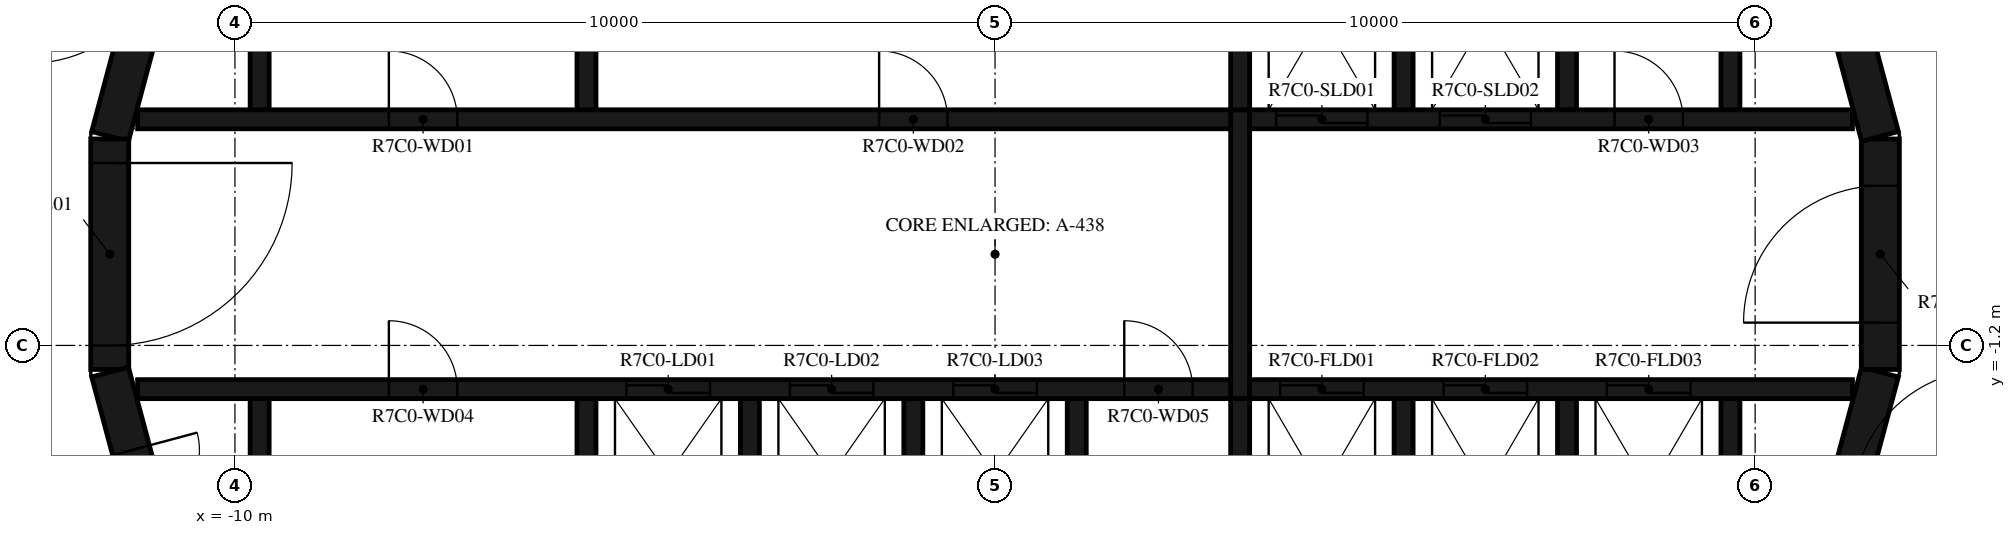
"""IFC4 building model, lengths in metres.
Left out: names, types, materials, properties, quantities, classifications, styles, units other than length and angle.
Written with IfcOpenShell. Run it as: python <this file> out.ifc"""

import sys

from ifc_helpers import new_model, si_unit, direction, frame, frame_2d, origin, place, context, subcontext, project, spatial, polyline, rectangle, outline, extrude, element, fill, save


model = new_model("IFC4")
c1 = context("Model", 3, precision=1e-05, world=origin(), true_north=direction((0.0, 1.0)))
c2 = subcontext(c1, "Body", "Model", "MODEL_VIEW")
j1 = project(units=[si_unit("LENGTHUNIT", "METRE"), si_unit("PLANEANGLEUNIT", "RADIAN")], contexts=[c1])
p1 = place(None, origin())
s1 = spatial("IfcSite", under=j1, at=p1, CompositionType="ELEMENT")
p2 = place(p1, origin())
s2 = spatial("IfcBuilding", under=s1, at=p2, CompositionType="ELEMENT")
p3 = place(p2, frame((0.0, 0.0, 284.4)))
s3 = spatial("IfcBuildingStorey", under=s2, at=p3, CompositionType="ELEMENT", Elevation=284.4)
p4 = place(p3, frame((10.858, -4.479, 0.0), z_axis=(0.0, 0.0, 1.0), x_axis=(0.258734743916, 0.965948410781, 0.0)))
e1 = element("IfcWall", 1, at=p4, inside=s3, PredefinedType="SHEAR", context=c2, shape_type="SweptSolid", body=[
    extrude(rectangle(XDim=3.033, YDim=0.5, at=frame_2d((1.516, 0.0))), origin(), (0.0, 0.0, 1.0), 3.12),
])
p5 = place(p3, frame((11.647, -1.516, 0.0), z_axis=(0.0, 0.0, 1.0), x_axis=(0.0, 1.0, 0.0)))
e2 = element("IfcWall", 2, at=p5, inside=s3, PredefinedType="SHEAR", context=c2, shape_type="SweptSolid", body=[
    extrude(rectangle(XDim=3.033, YDim=0.5, at=frame_2d((1.516, 0.0))), origin(), (0.0, 0.0, 1.0), 3.12),
])
p6 = place(p5, frame((0.616, 0.0, 0.0)))
e3 = element("IfcOpeningElement", 3, at=p6, cuts=e2, PredefinedType="OPENING", context=c2, shape_type="SweptSolid", body=[
    extrude(rectangle(XDim=1.8, YDim=2.1, at=frame_2d((0.9, 1.05))), frame((0.0, 0.26, 0.0), z_axis=(0.0, -1.0, 0.0), x_axis=(1.0, 0.0, 0.0)), (0.0, 0.0, 1.0), 0.52),
])
for number, where, z_axis, x_axis in (
    (4, (11.643, 1.55, 0.0), (0.0, 0.0, 1.0), (-0.259, 0.966, 0.0)),
    (5, (-10.858, 4.479, 0.0), (0.0, 0.0, 1.0), (-0.259, -0.966, 0.0)),
):
    element("IfcWall", number, at=place(p3, frame(where, z_axis=z_axis, x_axis=x_axis)), inside=s3, PredefinedType="SHEAR", context=c2, shape_type="SweptSolid", body=[
        extrude(rectangle(XDim=3.033, YDim=0.5, at=frame_2d((1.516, 0.0))), origin(), (0.0, 0.0, 1.0), 3.12),
    ])
p7 = place(p3, frame((-11.647, 1.516, 0.0), z_axis=(0.0, 0.0, 1.0), x_axis=(0.0, -1.0, 0.0)))
e6 = element("IfcWall", 6, at=p7, inside=s3, PredefinedType="SHEAR", context=c2, shape_type="SweptSolid", body=[
    extrude(rectangle(XDim=3.033, YDim=0.5, at=frame_2d((1.516, 0.0))), origin(), (0.0, 0.0, 1.0), 3.12),
])
p8 = place(p7, frame((0.316, 0.0, 0.0)))
e7 = element("IfcOpeningElement", 7, at=p8, cuts=e6, PredefinedType="OPENING", context=c2, shape_type="SweptSolid", body=[
    extrude(rectangle(XDim=2.4, YDim=2.1, at=frame_2d((1.2, 1.05))), frame((0.0, 0.26, 0.0), z_axis=(0.0, -1.0, 0.0), x_axis=(1.0, 0.0, 0.0)), (0.0, 0.0, 1.0), 0.52),
])
p9 = place(p3, frame((-11.643, -1.55, 0.0), z_axis=(0.0, 0.0, 1.0), x_axis=(0.258734743916, -0.965948410781, 0.0)))
e8 = element("IfcWall", 8, at=p9, inside=s3, PredefinedType="SHEAR", context=c2, shape_type="SweptSolid", body=[
    extrude(rectangle(XDim=3.033, YDim=0.5, at=frame_2d((1.516, 0.0))), origin(), (0.0, 0.0, 1.0), 3.12),
])
p10 = place(p9, frame((1.066, 0.0, 0.0)))
e9 = element("IfcOpeningElement", 9, at=p10, cuts=e8, PredefinedType="OPENING", context=c2, shape_type="SweptSolid", body=[
    extrude(rectangle(XDim=0.9, YDim=2.1, at=frame_2d((0.45, 1.05))), frame((0.0, 0.26, 0.0), z_axis=(0.0, -1.0, 0.0), x_axis=(1.0, 0.0, 0.0)), (0.0, 0.0, 1.0), 0.52),
])
p11 = place(p3, origin())
e10 = element("IfcWall", 10, at=p11, inside=s3, PredefinedType="SHEAR", context=c2, shape_type="SweptSolid", body=[
    extrude(outline(polyline([(-9.8, 1.9), (-9.55, 1.9), (-9.55, 4.8), (-5.5, 4.8), (-5.5, 1.9), (-5.25, 1.9), (-5.25, 4.8), (3.1, 4.8), (3.1, 1.9), (3.35, 1.9), (3.35, 4.8), (5.25, 4.8), (5.25, 1.9), (5.5, 1.9), (5.5, 4.8), (7.4, 4.8), (7.4, 1.9), (7.65, 1.9), (7.65, 4.8), (9.55, 4.8), (9.55, 1.9), (9.8, 1.9), (9.8, 4.8), (9.8, 5.05), (-9.8, 5.05), (-9.8, 4.8), (-9.8, 1.9)])), origin(), (0.0, 0.0, 1.0), 3.12),
])
p12 = place(p3, origin())
e11 = element("IfcWall", 11, at=p12, inside=s3, PredefinedType="SHEAR", context=c2, shape_type="SweptSolid", body=[
    extrude(outline(polyline([(9.8, -5.05), (9.8, -4.8), (9.8, -1.9), (9.55, -1.9), (9.55, -4.8), (7.65, -4.8), (7.65, -1.9), (7.4, -1.9), (7.4, -4.8), (5.5, -4.8), (5.5, -1.9), (5.25, -1.9), (5.25, -4.8), (3.35, -4.8), (3.35, -1.9), (3.1, -1.9), (3.1, -4.8), (1.2, -4.8), (1.2, -1.9), (0.95, -1.9), (0.95, -4.8), (-0.95, -4.8), (-0.95, -1.9), (-1.2, -1.9), (-1.2, -4.8), (-3.1, -4.8), (-3.1, -1.9), (-3.35, -1.9), (-3.35, -4.8), (-5.25, -4.8), (-5.25, -1.9), (-5.5, -1.9), (-5.5, -4.8), (-9.55, -4.8), (-9.55, -1.9), (-9.8, -1.9), (-9.8, -4.8), (-9.8, -5.05), (9.8, -5.05)])), origin(), (0.0, 0.0, 1.0), 3.12),
])
p13 = place(p3, frame((-11.28, 1.775, 0.0), z_axis=(0.0, 0.0, 1.0), x_axis=(1.0, 0.0, 0.0)))
e12 = element("IfcWall", 12, at=p13, inside=s3, PredefinedType="SHEAR", context=c2, shape_type="SweptSolid", body=[
    extrude(rectangle(XDim=14.38, YDim=0.25, at=frame_2d((7.19, 0.0))), origin(), (0.0, 0.0, 1.0), 3.12),
])
p14 = place(p13, frame((3.305, 0.0, 0.0)))
e13 = element("IfcOpeningElement", 13, at=p14, cuts=e12, PredefinedType="OPENING", context=c2, shape_type="SweptSolid", body=[
    extrude(rectangle(XDim=0.9, YDim=2.1, at=frame_2d((0.45, 1.05))), frame((0.0, 0.135, 0.0), z_axis=(0.0, -1.0, 0.0), x_axis=(1.0, 0.0, 0.0)), (0.0, 0.0, 1.0), 0.27),
])
p15 = place(p13, frame((9.755, 0.0, 0.0)))
e14 = element("IfcOpeningElement", 14, at=p15, cuts=e12, PredefinedType="OPENING", context=c2, shape_type="SweptSolid", body=[
    extrude(rectangle(XDim=0.9, YDim=2.1, at=frame_2d((0.45, 1.05))), frame((0.0, 0.135, 0.0), z_axis=(0.0, -1.0, 0.0), x_axis=(1.0, 0.0, 0.0)), (0.0, 0.0, 1.0), 0.27),
])
p16 = place(p3, frame((3.35, 1.775, 0.0), z_axis=(0.0, 0.0, 1.0), x_axis=(1.0, 0.0, 0.0)))
e15 = element("IfcWall", 15, at=p16, inside=s3, PredefinedType="SHEAR", context=c2, shape_type="SweptSolid", body=[
    extrude(rectangle(XDim=7.93, YDim=0.25, at=frame_2d((3.965, 0.0))), origin(), (0.0, 0.0, 1.0), 3.12),
])
p17 = place(p16, frame((0.35, 0.0, 0.0)))
e16 = element("IfcOpeningElement", 16, at=p17, cuts=e15, PredefinedType="OPENING", context=c2, shape_type="SweptSolid", body=[
    extrude(rectangle(XDim=1.2, YDim=2.4, at=frame_2d((0.6, 1.2))), frame((0.0, 0.135, 0.0), z_axis=(0.0, -1.0, 0.0), x_axis=(1.0, 0.0, 0.0)), (0.0, 0.0, 1.0), 0.27),
])
p18 = place(p16, frame((2.5, 0.0, 0.0)))
e17 = element("IfcOpeningElement", 17, at=p18, cuts=e15, PredefinedType="OPENING", context=c2, shape_type="SweptSolid", body=[
    extrude(rectangle(XDim=1.2, YDim=2.4, at=frame_2d((0.6, 1.2))), frame((0.0, 0.135, 0.0), z_axis=(0.0, -1.0, 0.0), x_axis=(1.0, 0.0, 0.0)), (0.0, 0.0, 1.0), 0.27),
])
p19 = place(p16, frame((4.8, 0.0, 0.0)))
e18 = element("IfcOpeningElement", 18, at=p19, cuts=e15, PredefinedType="OPENING", context=c2, shape_type="SweptSolid", body=[
    extrude(rectangle(XDim=0.9, YDim=2.1, at=frame_2d((0.45, 1.05))), frame((0.0, 0.135, 0.0), z_axis=(0.0, -1.0, 0.0), x_axis=(1.0, 0.0, 0.0)), (0.0, 0.0, 1.0), 0.27),
])
p20 = place(p3, frame((-11.28, -1.775, 0.0), z_axis=(0.0, 0.0, 1.0), x_axis=(1.0, 0.0, 0.0)))
e19 = element("IfcWall", 19, at=p20, inside=s3, PredefinedType="SHEAR", context=c2, shape_type="SweptSolid", body=[
    extrude(rectangle(XDim=14.38, YDim=0.25, at=frame_2d((7.19, 0.0))), origin(), (0.0, 0.0, 1.0), 3.12),
])
p21 = place(p20, frame((6.43, 0.0, 0.0)))
e20 = element("IfcOpeningElement", 20, at=p21, cuts=e19, PredefinedType="OPENING", context=c2, shape_type="SweptSolid", body=[
    extrude(rectangle(XDim=1.1, YDim=2.1, at=frame_2d((0.55, 1.05))), frame((0.0, 0.135, 0.0), z_axis=(0.0, -1.0, 0.0), x_axis=(1.0, 0.0, 0.0)), (0.0, 0.0, 1.0), 0.27),
])
p22 = place(p20, frame((8.58, 0.0, 0.0)))
e21 = element("IfcOpeningElement", 21, at=p22, cuts=e19, PredefinedType="OPENING", context=c2, shape_type="SweptSolid", body=[
    extrude(rectangle(XDim=1.1, YDim=2.1, at=frame_2d((0.55, 1.05))), frame((0.0, 0.135, 0.0), z_axis=(0.0, -1.0, 0.0), x_axis=(1.0, 0.0, 0.0)), (0.0, 0.0, 1.0), 0.27),
])
p23 = place(p20, frame((10.73, 0.0, 0.0)))
e22 = element("IfcOpeningElement", 22, at=p23, cuts=e19, PredefinedType="OPENING", context=c2, shape_type="SweptSolid", body=[
    extrude(rectangle(XDim=1.1, YDim=2.1, at=frame_2d((0.55, 1.05))), frame((0.0, 0.135, 0.0), z_axis=(0.0, -1.0, 0.0), x_axis=(1.0, 0.0, 0.0)), (0.0, 0.0, 1.0), 0.27),
])
p24 = place(p20, frame((3.305, 0.0, 0.0)))
e23 = element("IfcOpeningElement", 23, at=p24, cuts=e19, PredefinedType="OPENING", context=c2, shape_type="SweptSolid", body=[
    extrude(rectangle(XDim=0.9, YDim=2.1, at=frame_2d((0.45, 1.05))), frame((0.0, 0.135, 0.0), z_axis=(0.0, -1.0, 0.0), x_axis=(1.0, 0.0, 0.0)), (0.0, 0.0, 1.0), 0.27),
])
p25 = place(p20, frame((12.98, 0.0, 0.0)))
e24 = element("IfcOpeningElement", 24, at=p25, cuts=e19, PredefinedType="OPENING", context=c2, shape_type="SweptSolid", body=[
    extrude(rectangle(XDim=0.9, YDim=2.1, at=frame_2d((0.45, 1.05))), frame((0.0, 0.135, 0.0), z_axis=(0.0, -1.0, 0.0), x_axis=(1.0, 0.0, 0.0)), (0.0, 0.0, 1.0), 0.27),
])
p26 = place(p3, frame((3.35, -1.775, 0.0), z_axis=(0.0, 0.0, 1.0), x_axis=(1.0, 0.0, 0.0)))
e25 = element("IfcWall", 25, at=p26, inside=s3, PredefinedType="SHEAR", context=c2, shape_type="SweptSolid", body=[
    extrude(rectangle(XDim=7.93, YDim=0.25, at=frame_2d((3.965, 0.0))), origin(), (0.0, 0.0, 1.0), 3.12),
])
p27 = place(p26, frame((0.4, 0.0, 0.0)))
e26 = element("IfcOpeningElement", 26, at=p27, cuts=e25, PredefinedType="OPENING", context=c2, shape_type="SweptSolid", body=[
    extrude(rectangle(XDim=1.1, YDim=2.4, at=frame_2d((0.55, 1.2))), frame((0.0, 0.135, 0.0), z_axis=(0.0, -1.0, 0.0), x_axis=(1.0, 0.0, 0.0)), (0.0, 0.0, 1.0), 0.27),
])
p28 = place(p26, frame((2.55, 0.0, 0.0)))
e27 = element("IfcOpeningElement", 27, at=p28, cuts=e25, PredefinedType="OPENING", context=c2, shape_type="SweptSolid", body=[
    extrude(rectangle(XDim=1.1, YDim=2.4, at=frame_2d((0.55, 1.2))), frame((0.0, 0.135, 0.0), z_axis=(0.0, -1.0, 0.0), x_axis=(1.0, 0.0, 0.0)), (0.0, 0.0, 1.0), 0.27),
])
p29 = place(p26, frame((4.7, 0.0, 0.0)))
e28 = element("IfcOpeningElement", 28, at=p29, cuts=e25, PredefinedType="OPENING", context=c2, shape_type="SweptSolid", body=[
    extrude(rectangle(XDim=1.1, YDim=2.4, at=frame_2d((0.55, 1.2))), frame((0.0, 0.135, 0.0), z_axis=(0.0, -1.0, 0.0), x_axis=(1.0, 0.0, 0.0)), (0.0, 0.0, 1.0), 0.27),
])
p30 = place(p3, frame((3.225, -1.9, 0.0), z_axis=(0.0, 0.0, 1.0), x_axis=(0.0, 1.0, 0.0)))
e29 = element("IfcWall", 29, at=p30, inside=s3, PredefinedType="SHEAR", context=c2, shape_type="SweptSolid", body=[
    extrude(rectangle(XDim=3.8, YDim=0.25, at=frame_2d((1.9, 0.0))), origin(), (0.0, 0.0, 1.0), 3.12),
])
p31 = place(p3, frame((11.223, -8.154, 0.0), z_axis=(0.0, 0.0, 1.0), x_axis=(0.358341090983, 0.93359073609, 0.0)))
e30 = element("IfcWall", 30, at=p31, inside=s3, PredefinedType="STANDARD", context=c2, shape_type="SweptSolid", body=[
    extrude(rectangle(XDim=7.181, YDim=0.2, at=frame_2d((3.59, 0.0))), origin(), (0.0, 0.0, 1.0), 3.12),
])
p32 = place(p31, frame((5.185, 0.0, 0.0)))
e31 = element("IfcOpeningElement", 31, at=p32, cuts=e30, PredefinedType="OPENING", context=c2, shape_type="SweptSolid", body=[
    extrude(rectangle(XDim=1.8, YDim=2.1, at=frame_2d((0.9, 1.05))), frame((0.0, 0.11, 0.0), z_axis=(0.0, -1.0, 0.0), x_axis=(1.0, 0.0, 0.0)), (0.0, 0.0, 1.0), 0.22),
])
p33 = place(p3, frame((-11.223, 8.154, 0.0), z_axis=(0.0, 0.0, 1.0), x_axis=(-0.358341090983, -0.93359073609, 0.0)))
e32 = element("IfcWall", 32, at=p33, inside=s3, PredefinedType="STANDARD", context=c2, shape_type="SweptSolid", body=[
    extrude(rectangle(XDim=7.181, YDim=0.2, at=frame_2d((3.59, 0.0))), origin(), (0.0, 0.0, 1.0), 3.12),
])
p34 = place(p33, frame((4.114, 0.0, 0.0)))
e33 = element("IfcOpeningElement", 33, at=p34, cuts=e32, PredefinedType="OPENING", context=c2, shape_type="SweptSolid", body=[
    extrude(rectangle(XDim=1.8, YDim=2.1, at=frame_2d((0.9, 1.05))), frame((0.0, 0.11, 0.0), z_axis=(0.0, -1.0, 0.0), x_axis=(1.0, 0.0, 0.0)), (0.0, 0.0, 1.0), 0.22),
])
p35 = place(p8, origin())
e34 = element("IfcDoor", 34, at=p35, inside=s3, OperationType="DOUBLE_DOOR_SINGLE_SWING", PredefinedType="DOOR", context=c2, shape_type="SweptSolid", body=[
    extrude(rectangle(XDim=2.4, YDim=2.1, at=frame_2d((1.2, 1.05))), frame((0.0, 0.025, 0.0), z_axis=(0.0, -1.0, 0.0), x_axis=(1.0, 0.0, 0.0)), (0.0, 0.0, 1.0), 0.05),
])
fill(e7, e34)
p36 = place(p6, origin())
e35 = element("IfcDoor", 35, at=p36, inside=s3, OperationType="DOUBLE_DOOR_SINGLE_SWING", PredefinedType="DOOR", context=c2, shape_type="SweptSolid", body=[
    extrude(rectangle(XDim=1.8, YDim=2.1, at=frame_2d((0.9, 1.05))), frame((0.0, 0.025, 0.0), z_axis=(0.0, -1.0, 0.0), x_axis=(1.0, 0.0, 0.0)), (0.0, 0.0, 1.0), 0.05),
])
fill(e3, e35)
p37 = place(p17, origin())
e36 = element("IfcDoor", 36, at=p37, inside=s3, OperationType="DOUBLE_DOOR_SLIDING", PredefinedType="DOOR", context=c2, shape_type="SweptSolid", body=[
    extrude(rectangle(XDim=1.2, YDim=2.4, at=frame_2d((0.6, 1.2))), frame((0.0, 0.025, 0.0), z_axis=(0.0, -1.0, 0.0), x_axis=(1.0, 0.0, 0.0)), (0.0, 0.0, 1.0), 0.05),
])
fill(e16, e36)
p38 = place(p18, origin())
e37 = element("IfcDoor", 37, at=p38, inside=s3, OperationType="DOUBLE_DOOR_SLIDING", PredefinedType="DOOR", context=c2, shape_type="SweptSolid", body=[
    extrude(rectangle(XDim=1.2, YDim=2.4, at=frame_2d((0.6, 1.2))), frame((0.0, 0.025, 0.0), z_axis=(0.0, -1.0, 0.0), x_axis=(1.0, 0.0, 0.0)), (0.0, 0.0, 1.0), 0.05),
])
fill(e17, e37)
p39 = place(p21, origin())
e38 = element("IfcDoor", 38, at=p39, inside=s3, OperationType="DOUBLE_DOOR_SLIDING", PredefinedType="DOOR", context=c2, shape_type="SweptSolid", body=[
    extrude(rectangle(XDim=1.1, YDim=2.1, at=frame_2d((0.55, 1.05))), frame((0.0, 0.025, 0.0), z_axis=(0.0, -1.0, 0.0), x_axis=(1.0, 0.0, 0.0)), (0.0, 0.0, 1.0), 0.05),
])
fill(e20, e38)
p40 = place(p22, origin())
e39 = element("IfcDoor", 39, at=p40, inside=s3, OperationType="DOUBLE_DOOR_SLIDING", PredefinedType="DOOR", context=c2, shape_type="SweptSolid", body=[
    extrude(rectangle(XDim=1.1, YDim=2.1, at=frame_2d((0.55, 1.05))), frame((0.0, 0.025, 0.0), z_axis=(0.0, -1.0, 0.0), x_axis=(1.0, 0.0, 0.0)), (0.0, 0.0, 1.0), 0.05),
])
fill(e21, e39)
p41 = place(p23, origin())
e40 = element("IfcDoor", 40, at=p41, inside=s3, OperationType="DOUBLE_DOOR_SLIDING", PredefinedType="DOOR", context=c2, shape_type="SweptSolid", body=[
    extrude(rectangle(XDim=1.1, YDim=2.1, at=frame_2d((0.55, 1.05))), frame((0.0, 0.025, 0.0), z_axis=(0.0, -1.0, 0.0), x_axis=(1.0, 0.0, 0.0)), (0.0, 0.0, 1.0), 0.05),
])
fill(e22, e40)
p42 = place(p27, origin())
e41 = element("IfcDoor", 41, at=p42, inside=s3, OperationType="DOUBLE_DOOR_SLIDING", PredefinedType="DOOR", context=c2, shape_type="SweptSolid", body=[
    extrude(rectangle(XDim=1.1, YDim=2.4, at=frame_2d((0.55, 1.2))), frame((0.0, 0.025, 0.0), z_axis=(0.0, -1.0, 0.0), x_axis=(1.0, 0.0, 0.0)), (0.0, 0.0, 1.0), 0.05),
])
fill(e26, e41)
p43 = place(p28, origin())
e42 = element("IfcDoor", 42, at=p43, inside=s3, OperationType="DOUBLE_DOOR_SLIDING", PredefinedType="DOOR", context=c2, shape_type="SweptSolid", body=[
    extrude(rectangle(XDim=1.1, YDim=2.4, at=frame_2d((0.55, 1.2))), frame((0.0, 0.025, 0.0), z_axis=(0.0, -1.0, 0.0), x_axis=(1.0, 0.0, 0.0)), (0.0, 0.0, 1.0), 0.05),
])
fill(e27, e42)
p44 = place(p29, origin())
e43 = element("IfcDoor", 43, at=p44, inside=s3, OperationType="DOUBLE_DOOR_SLIDING", PredefinedType="DOOR", context=c2, shape_type="SweptSolid", body=[
    extrude(rectangle(XDim=1.1, YDim=2.4, at=frame_2d((0.55, 1.2))), frame((0.0, 0.025, 0.0), z_axis=(0.0, -1.0, 0.0), x_axis=(1.0, 0.0, 0.0)), (0.0, 0.0, 1.0), 0.05),
])
fill(e28, e43)
p45 = place(p14, origin())
e44 = element("IfcDoor", 44, at=p45, inside=s3, OperationType="SINGLE_SWING_LEFT", PredefinedType="DOOR", context=c2, shape_type="SweptSolid", body=[
    extrude(rectangle(XDim=0.9, YDim=2.1, at=frame_2d((0.45, 1.05))), frame((0.0, 0.025, 0.0), z_axis=(0.0, -1.0, 0.0), x_axis=(1.0, 0.0, 0.0)), (0.0, 0.0, 1.0), 0.05),
])
fill(e13, e44)
p46 = place(p15, origin())
e45 = element("IfcDoor", 45, at=p46, inside=s3, OperationType="SINGLE_SWING_RIGHT", PredefinedType="DOOR", context=c2, shape_type="SweptSolid", body=[
    extrude(rectangle(XDim=0.9, YDim=2.1, at=frame_2d((0.45, 1.05))), frame((0.0, 0.025, 0.0), z_axis=(0.0, -1.0, 0.0), x_axis=(1.0, 0.0, 0.0)), (0.0, 0.0, 1.0), 0.05),
])
fill(e14, e45)
p47 = place(p19, origin())
e46 = element("IfcDoor", 46, at=p47, inside=s3, OperationType="SINGLE_SWING_LEFT", PredefinedType="DOOR", context=c2, shape_type="SweptSolid", body=[
    extrude(rectangle(XDim=0.9, YDim=2.1, at=frame_2d((0.45, 1.05))), frame((0.0, 0.025, 0.0), z_axis=(0.0, -1.0, 0.0), x_axis=(1.0, 0.0, 0.0)), (0.0, 0.0, 1.0), 0.05),
])
fill(e18, e46)
p48 = place(p24, origin())
e47 = element("IfcDoor", 47, at=p48, inside=s3, OperationType="SINGLE_SWING_RIGHT", PredefinedType="DOOR", context=c2, shape_type="SweptSolid", body=[
    extrude(rectangle(XDim=0.9, YDim=2.1, at=frame_2d((0.45, 1.05))), frame((0.0, 0.025, 0.0), z_axis=(0.0, -1.0, 0.0), x_axis=(1.0, 0.0, 0.0)), (0.0, 0.0, 1.0), 0.05),
])
fill(e23, e47)
p49 = place(p25, origin())
e48 = element("IfcDoor", 48, at=p49, inside=s3, OperationType="SINGLE_SWING_LEFT", PredefinedType="DOOR", context=c2, shape_type="SweptSolid", body=[
    extrude(rectangle(XDim=0.9, YDim=2.1, at=frame_2d((0.45, 1.05))), frame((0.0, 0.025, 0.0), z_axis=(0.0, -1.0, 0.0), x_axis=(1.0, 0.0, 0.0)), (0.0, 0.0, 1.0), 0.05),
])
fill(e24, e48)
p50 = place(p10, origin())
e49 = element("IfcDoor", 49, at=p50, inside=s3, OperationType="SINGLE_SWING_RIGHT", PredefinedType="DOOR", context=c2, shape_type="SweptSolid", body=[
    extrude(rectangle(XDim=0.9, YDim=2.1, at=frame_2d((0.45, 1.05))), frame((0.0, 0.025, 0.0), z_axis=(0.0, -1.0, 0.0), x_axis=(1.0, 0.0, 0.0)), (0.0, 0.0, 1.0), 0.05),
])
fill(e9, e49)
save(model, sys.argv[1])
